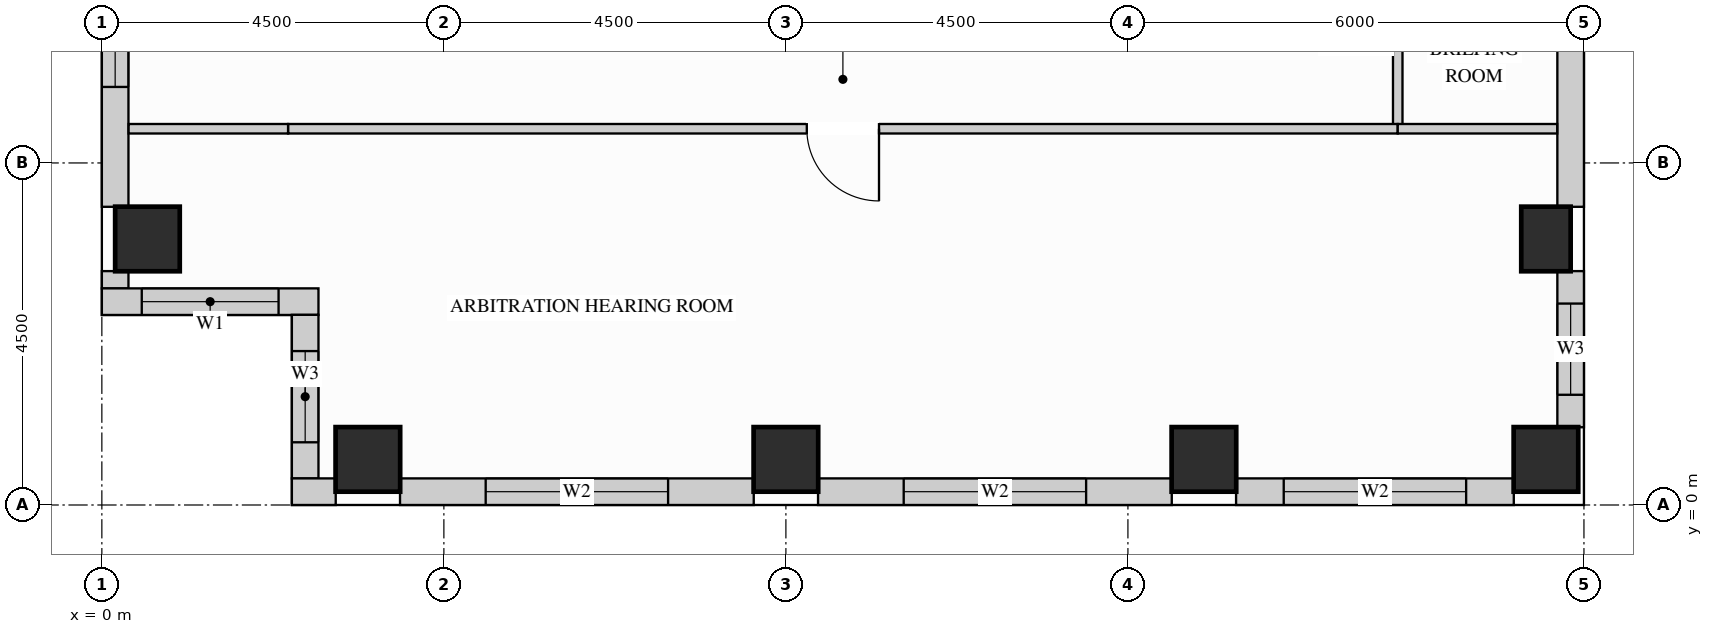
"""IFC4 building model, lengths in metres.
Left out: names, types, materials, properties, quantities, classifications, styles, units other than length and angle.
Written with IfcOpenShell. Run it as: python <this file> out.ifc"""

import sys

from ifc_helpers import new_model, si_unit, direction, frame, frame_2d, origin, origin_2d, place, context, subcontext, project, spatial, rectangle, extrude, source, transform, mapped, element, fill, save


model = new_model("IFC4")
c1 = context("Model", 3, precision=1e-05, world=origin(), true_north=direction((0.0, 1.0)))
c2 = subcontext(c1, "Body", "Model", "MODEL_VIEW")
j1 = project(units=[si_unit("LENGTHUNIT", "METRE"), si_unit("PLANEANGLEUNIT", "RADIAN")], contexts=[c1])
p1 = place(None, origin())
s1 = spatial("IfcSite", under=j1, at=p1, CompositionType="ELEMENT")
p2 = place(p1, origin())
s2 = spatial("IfcBuilding", under=s1, at=p2, CompositionType="ELEMENT")
p3 = place(p2, frame((0.0, 0.0, 223.2)))
s3 = spatial("IfcBuildingStorey", under=s2, at=p3, CompositionType="ELEMENT", Elevation=223.2)
m1 = source(origin(), c2, "Body", "SweptSolid", [
    extrude(rectangle(XDim=0.65, YDim=0.85, at=origin_2d()), origin(), (0.0, 0.0, 1.0), 3.4),
])
p4 = place(p3, frame((19.0, 3.5, 0.0), z_axis=(0.0, 0.0, 1.0), x_axis=(1.0, 0.0, 0.0)))
e1 = element("IfcColumn", 1, at=p4, inside=s3, PredefinedType="COLUMN", context=c2, shape_type="MappedRepresentation", body=[
    mapped(m1, transform((0.0, 0.0, 0.0), x_axis=(1.0, 0.0, 0.0), y_axis=(0.0, 1.0, 0.0), z_axis=(0.0, 0.0, 1.0))),
])
m2 = source(origin(), c2, "Body", "SweptSolid", [
    extrude(rectangle(XDim=0.85, YDim=0.85, at=origin_2d()), origin(), (0.0, 0.0, 1.0), 3.4),
])
for number, where, z_axis, x_axis in (
    (2, (14.5, 0.6, 0.0), (0.0, 0.0, 1.0), (1.0, 0.0, 0.0)),
    (3, (19.0, 0.6, 0.0), (0.0, 0.0, 1.0), (1.0, 0.0, 0.0)),
    (4, (3.5, 0.6, 0.0), (0.0, 0.0, 1.0), (1.0, 0.0, 0.0)),
    (5, (9.0, 0.6, 0.0), (0.0, 0.0, 1.0), (1.0, 0.0, 0.0)),
    (6, (0.6, 3.5, 0.0), (0.0, 0.0, 1.0), (1.0, 0.0, 0.0)),
):
    element("IfcColumn", number, at=place(p3, frame(where, z_axis=z_axis, x_axis=x_axis)), inside=s3, PredefinedType="COLUMN", context=c2, shape_type="MappedRepresentation", body=[
        mapped(m2, transform((0.0, 0.0, 0.0), x_axis=(1.0, 0.0, 0.0), y_axis=(0.0, 1.0, 0.0), z_axis=(0.0, 0.0, 1.0))),
    ])
p5 = place(p3, frame((0.175, 8.077, 0.0), z_axis=(0.0, 0.0, 1.0), x_axis=(0.0, -1.0, 0.0)))
e7 = element("IfcWall", 7, at=p5, inside=s3, PredefinedType="SOLIDWALL", context=c2, shape_type="SweptSolid", body=[
    extrude(rectangle(XDim=4.154, YDim=0.35, at=frame_2d((2.077, 0.0))), origin(), (0.0, 0.0, 1.0), 3.385),
])
p6 = place(p5, frame((0.777, 0.0, 0.78)))
e8 = element("IfcOpeningElement", 8, at=p6, cuts=e7, PredefinedType="OPENING", context=c2, shape_type="SweptSolid", body=[
    extrude(rectangle(XDim=1.8, YDim=2.1, at=frame_2d((0.9, 1.05))), frame((0.0, 0.185, 0.0), z_axis=(0.0, -1.0, 0.0), x_axis=(1.0, 0.0, 0.0)), (0.0, 0.0, 1.0), 0.37),
])
m3 = source(origin(), c2, "Body", "SweptSolid", [
    extrude(rectangle(XDim=0.229, YDim=0.35, at=frame_2d((0.115, 0.0))), origin(), (0.0, 0.0, 1.0), 3.385),
])
p7 = place(p3, frame((0.175, 3.077, 0.0), z_axis=(0.0, 0.0, 1.0), x_axis=(0.0, -1.0, 0.0)))
e9 = element("IfcWall", 9, at=p7, inside=s3, PredefinedType="SOLIDWALL", context=c2, shape_type="MappedRepresentation", body=[
    mapped(m3, transform((0.0, 0.0, 0.0), x_axis=(1.0, 0.0, 0.0), y_axis=(0.0, 1.0, 0.0), z_axis=(0.0, 0.0, 1.0))),
])
p8 = place(p3, frame((0.0, 2.675, 0.0), z_axis=(0.0, 0.0, 1.0), x_axis=(1.0, 0.0, 0.0)))
e10 = element("IfcWall", 10, at=p8, inside=s3, PredefinedType="SOLIDWALL", context=c2, shape_type="SweptSolid", body=[
    extrude(rectangle(XDim=2.85, YDim=0.35, at=frame_2d((1.425, 0.0))), origin(), (0.0, 0.0, 1.0), 3.385),
])
p9 = place(p8, frame((0.525, 0.0, 0.78)))
e11 = element("IfcOpeningElement", 11, at=p9, cuts=e10, PredefinedType="OPENING", context=c2, shape_type="SweptSolid", body=[
    extrude(rectangle(XDim=1.8, YDim=2.1, at=frame_2d((0.9, 1.05))), frame((0.0, 0.185, 0.0), z_axis=(0.0, -1.0, 0.0), x_axis=(1.0, 0.0, 0.0)), (0.0, 0.0, 1.0), 0.37),
])
p10 = place(p3, frame((2.675, 2.502, 0.0), z_axis=(0.0, 0.0, 1.0), x_axis=(0.0, -1.0, 0.0)))
e12 = element("IfcWall", 12, at=p10, inside=s3, PredefinedType="SOLIDWALL", context=c2, shape_type="SweptSolid", body=[
    extrude(rectangle(XDim=2.154, YDim=0.35, at=frame_2d((1.077, 0.0))), origin(), (0.0, 0.0, 1.0), 3.385),
])
p11 = place(p10, frame((0.477, 0.0, 0.78)))
e13 = element("IfcOpeningElement", 13, at=p11, cuts=e12, PredefinedType="OPENING", context=c2, shape_type="SweptSolid", body=[
    extrude(rectangle(XDim=1.2, YDim=2.1, at=frame_2d((0.6, 1.05))), frame((0.0, 0.185, 0.0), z_axis=(0.0, -1.0, 0.0), x_axis=(1.0, 0.0, 0.0)), (0.0, 0.0, 1.0), 0.37),
])
m4 = source(origin(), c2, "Body", "SweptSolid", [
    extrude(rectangle(XDim=0.577, YDim=0.35, at=frame_2d((0.289, 0.0))), origin(), (0.0, 0.0, 1.0), 3.385),
])
p12 = place(p3, frame((2.5, 0.175, 0.0), z_axis=(0.0, 0.0, 1.0), x_axis=(1.0, 0.0, 0.0)))
e14 = element("IfcWall", 14, at=p12, inside=s3, PredefinedType="SOLIDWALL", context=c2, shape_type="MappedRepresentation", body=[
    mapped(m4, transform((0.0, 0.0, 0.0), x_axis=(1.0, 0.0, 0.0), y_axis=(0.0, 1.0, 0.0), z_axis=(0.0, 0.0, 1.0))),
])
p13 = place(p3, frame((3.923, 0.175, 0.0), z_axis=(0.0, 0.0, 1.0), x_axis=(1.0, 0.0, 0.0)))
e15 = element("IfcWall", 15, at=p13, inside=s3, PredefinedType="SOLIDWALL", context=c2, shape_type="SweptSolid", body=[
    extrude(rectangle(XDim=4.654, YDim=0.35, at=frame_2d((2.327, 0.0))), origin(), (0.0, 0.0, 1.0), 3.385),
])
p14 = place(p13, frame((1.127, 0.0, 0.78)))
e16 = element("IfcOpeningElement", 16, at=p14, cuts=e15, PredefinedType="OPENING", context=c2, shape_type="SweptSolid", body=[
    extrude(rectangle(XDim=2.4, YDim=2.1, at=frame_2d((1.2, 1.05))), frame((0.0, 0.185, 0.0), z_axis=(0.0, -1.0, 0.0), x_axis=(1.0, 0.0, 0.0)), (0.0, 0.0, 1.0), 0.37),
])
p15 = place(p3, frame((9.423, 0.175, 0.0), z_axis=(0.0, 0.0, 1.0), x_axis=(1.0, 0.0, 0.0)))
e17 = element("IfcWall", 17, at=p15, inside=s3, PredefinedType="SOLIDWALL", context=c2, shape_type="SweptSolid", body=[
    extrude(rectangle(XDim=4.654, YDim=0.35, at=frame_2d((2.327, 0.0))), origin(), (0.0, 0.0, 1.0), 3.385),
])
p16 = place(p15, frame((1.127, 0.0, 0.78)))
e18 = element("IfcOpeningElement", 18, at=p16, cuts=e17, PredefinedType="OPENING", context=c2, shape_type="SweptSolid", body=[
    extrude(rectangle(XDim=2.4, YDim=2.1, at=frame_2d((1.2, 1.05))), frame((0.0, 0.185, 0.0), z_axis=(0.0, -1.0, 0.0), x_axis=(1.0, 0.0, 0.0)), (0.0, 0.0, 1.0), 0.37),
])
p17 = place(p3, frame((14.923, 0.175, 0.0), z_axis=(0.0, 0.0, 1.0), x_axis=(1.0, 0.0, 0.0)))
e19 = element("IfcWall", 19, at=p17, inside=s3, PredefinedType="SOLIDWALL", context=c2, shape_type="SweptSolid", body=[
    extrude(rectangle(XDim=3.654, YDim=0.35, at=frame_2d((1.827, 0.0))), origin(), (0.0, 0.0, 1.0), 3.385),
])
p18 = place(p17, frame((0.627, 0.0, 0.78)))
e20 = element("IfcOpeningElement", 20, at=p18, cuts=e19, PredefinedType="OPENING", context=c2, shape_type="SweptSolid", body=[
    extrude(rectangle(XDim=2.4, YDim=2.1, at=frame_2d((1.2, 1.05))), frame((0.0, 0.185, 0.0), z_axis=(0.0, -1.0, 0.0), x_axis=(1.0, 0.0, 0.0)), (0.0, 0.0, 1.0), 0.37),
])
p19 = place(p3, frame((19.325, 1.023, 0.0), z_axis=(0.0, 0.0, 1.0), x_axis=(0.0, 1.0, 0.0)))
e21 = element("IfcWall", 21, at=p19, inside=s3, PredefinedType="SOLIDWALL", context=c2, shape_type="SweptSolid", body=[
    extrude(rectangle(XDim=2.054, YDim=0.35, at=frame_2d((1.027, 0.0))), origin(), (0.0, 0.0, 1.0), 2.619),
])
p20 = place(p19, frame((0.427, 0.0, 0.78)))
e22 = element("IfcOpeningElement", 22, at=p20, cuts=e21, PredefinedType="OPENING", context=c2, shape_type="SweptSolid", body=[
    extrude(rectangle(XDim=1.2, YDim=1.659, at=frame_2d((0.6, 0.83))), frame((0.0, 0.185, 0.0), z_axis=(0.0, -1.0, 0.0), x_axis=(1.0, 0.0, 0.0)), (0.0, 0.0, 1.0), 0.37),
])
m5 = source(origin(), c2, "Body", "SweptSolid", [
    extrude(rectangle(XDim=4.154, YDim=0.35, at=frame_2d((2.077, 0.0))), origin(), (0.0, 0.0, 1.0), 2.619),
])
p21 = place(p3, frame((19.325, 3.923, 0.0), z_axis=(0.0, 0.0, 1.0), x_axis=(0.0, 1.0, 0.0)))
e23 = element("IfcWall", 23, at=p21, inside=s3, PredefinedType="SOLIDWALL", context=c2, shape_type="MappedRepresentation", body=[
    mapped(m5, transform((0.0, 0.0, 0.0), x_axis=(1.0, 0.0, 0.0), y_axis=(0.0, 1.0, 0.0), z_axis=(0.0, 0.0, 1.0))),
])
p22 = place(p3, frame((17.05, 4.95, 0.0), z_axis=(0.0, 0.0, 1.0), x_axis=(0.0, 1.0, 0.0)))
e24 = element("IfcWall", 24, at=p22, inside=s3, PredefinedType="PARTITIONING", context=c2, shape_type="SweptSolid", body=[
    extrude(rectangle(XDim=5.65, YDim=0.125, at=frame_2d((2.825, 0.0))), origin(), (0.0, 0.0, 1.0), 3.385),
])
p23 = place(p22, frame((2.35, 0.0, 0.0)))
e25 = element("IfcOpeningElement", 25, at=p23, cuts=e24, PredefinedType="OPENING", context=c2, shape_type="SweptSolid", body=[
    extrude(rectangle(XDim=0.95, YDim=2.15, at=frame_2d((0.475, 1.075))), frame((0.0, 0.073, 0.0), z_axis=(0.0, -1.0, 0.0), x_axis=(1.0, 0.0, 0.0)), (0.0, 0.0, 1.0), 0.145),
])
p24 = place(p3, frame((2.45, 4.95, 0.0), z_axis=(0.0, 0.0, 1.0), x_axis=(1.0, 0.0, 0.0)))
e26 = element("IfcWall", 26, at=p24, inside=s3, PredefinedType="PARTITIONING", context=c2, shape_type="SweptSolid", body=[
    extrude(rectangle(XDim=14.6, YDim=0.125, at=frame_2d((7.3, 0.0))), origin(), (0.0, 0.0, 1.0), 2.848),
])
p25 = place(p24, frame((6.825, 0.0, 0.0)))
e27 = element("IfcOpeningElement", 27, at=p25, cuts=e26, PredefinedType="OPENING", context=c2, shape_type="SweptSolid", body=[
    extrude(rectangle(XDim=0.95, YDim=2.15, at=frame_2d((0.475, 1.075))), frame((0.0, 0.073, 0.0), z_axis=(0.0, -1.0, 0.0), x_axis=(1.0, 0.0, 0.0)), (0.0, 0.0, 1.0), 0.145),
])
m6 = source(origin(), c2, "Body", "SweptSolid", [
    extrude(rectangle(XDim=2.098, YDim=0.125, at=frame_2d((1.049, 0.0))), origin(), (0.0, 0.0, 1.0), 2.848),
])
for number, where, z_axis, x_axis in (
    (28, (0.352, 4.95, 0.0), (0.0, 0.0, 1.0), (1.0, 0.0, 0.0)),
    (29, (17.05, 4.95, 0.0), (0.0, 0.0, 1.0), (1.0, 0.0, 0.0)),
):
    element("IfcWall", number, at=place(p3, frame(where, z_axis=z_axis, x_axis=x_axis)), inside=s3, PredefinedType="PARTITIONING", context=c2, shape_type="MappedRepresentation", body=[
        mapped(m6, transform((0.0, 0.0, 0.0), x_axis=(1.0, 0.0, 0.0), y_axis=(0.0, 1.0, 0.0), z_axis=(0.0, 0.0, 1.0))),
    ])
m7 = source(origin(), c2, "Body", "SweptSolid", [
    extrude(rectangle(XDim=0.95, YDim=2.15, at=frame_2d((0.475, 1.075))), frame((0.0, 0.025, 0.0), z_axis=(0.0, -1.0, 0.0), x_axis=(1.0, 0.0, 0.0)), (0.0, 0.0, 1.0), 0.05),
])
p26 = place(p25, origin())
e30 = element("IfcDoor", 30, at=p26, inside=s3, OperationType="SINGLE_SWING_RIGHT", PredefinedType="DOOR", context=c2, shape_type="MappedRepresentation", body=[
    mapped(m7, transform((0.0, 0.0, 0.0), x_axis=(1.0, 0.0, 0.0), y_axis=(0.0, 1.0, 0.0), z_axis=(0.0, 0.0, 1.0))),
])
fill(e27, e30)
m8 = source(origin(), c2, "Body", "SweptSolid", [
    extrude(rectangle(XDim=1.8, YDim=2.1, at=frame_2d((0.9, 1.05))), frame((0.0, 0.03, 0.0), z_axis=(0.0, -1.0, 0.0), x_axis=(1.0, 0.0, 0.0)), (0.0, 0.0, 1.0), 0.06),
])
p27 = place(p6, origin())
e31 = element("IfcWindow", 31, at=p27, inside=s3, PartitioningType="SINGLE_PANEL", PredefinedType="WINDOW", context=c2, shape_type="MappedRepresentation", body=[
    mapped(m8, transform((0.0, 0.0, 0.0), x_axis=(1.0, 0.0, 0.0), y_axis=(0.0, 1.0, 0.0), z_axis=(0.0, 0.0, 1.0))),
])
fill(e8, e31)
p28 = place(p9, origin())
e32 = element("IfcWindow", 32, at=p28, inside=s3, PartitioningType="SINGLE_PANEL", PredefinedType="WINDOW", context=c2, shape_type="MappedRepresentation", body=[
    mapped(m8, transform((0.0, 0.0, 0.0), x_axis=(1.0, 0.0, 0.0), y_axis=(0.0, 1.0, 0.0), z_axis=(0.0, 0.0, 1.0))),
])
fill(e11, e32)
m9 = source(origin(), c2, "Body", "SweptSolid", [
    extrude(rectangle(XDim=2.4, YDim=2.1, at=frame_2d((1.2, 1.05))), frame((0.0, 0.03, 0.0), z_axis=(0.0, -1.0, 0.0), x_axis=(1.0, 0.0, 0.0)), (0.0, 0.0, 1.0), 0.06),
])
p29 = place(p14, origin())
e33 = element("IfcWindow", 33, at=p29, inside=s3, PartitioningType="SINGLE_PANEL", PredefinedType="WINDOW", context=c2, shape_type="MappedRepresentation", body=[
    mapped(m9, transform((0.0, 0.0, 0.0), x_axis=(1.0, 0.0, 0.0), y_axis=(0.0, 1.0, 0.0), z_axis=(0.0, 0.0, 1.0))),
])
fill(e16, e33)
p30 = place(p16, origin())
e34 = element("IfcWindow", 34, at=p30, inside=s3, PartitioningType="SINGLE_PANEL", PredefinedType="WINDOW", context=c2, shape_type="MappedRepresentation", body=[
    mapped(m9, transform((0.0, 0.0, 0.0), x_axis=(1.0, 0.0, 0.0), y_axis=(0.0, 1.0, 0.0), z_axis=(0.0, 0.0, 1.0))),
])
fill(e18, e34)
p31 = place(p18, origin())
e35 = element("IfcWindow", 35, at=p31, inside=s3, PartitioningType="SINGLE_PANEL", PredefinedType="WINDOW", context=c2, shape_type="MappedRepresentation", body=[
    mapped(m9, transform((0.0, 0.0, 0.0), x_axis=(1.0, 0.0, 0.0), y_axis=(0.0, 1.0, 0.0), z_axis=(0.0, 0.0, 1.0))),
])
fill(e20, e35)
m10 = source(origin(), c2, "Body", "SweptSolid", [
    extrude(rectangle(XDim=1.2, YDim=2.1, at=frame_2d((0.6, 1.05))), frame((0.0, 0.03, 0.0), z_axis=(0.0, -1.0, 0.0), x_axis=(1.0, 0.0, 0.0)), (0.0, 0.0, 1.0), 0.06),
])
p32 = place(p11, origin())
e36 = element("IfcWindow", 36, at=p32, inside=s3, PartitioningType="SINGLE_PANEL", PredefinedType="WINDOW", context=c2, shape_type="MappedRepresentation", body=[
    mapped(m10, transform((0.0, 0.0, 0.0), x_axis=(1.0, 0.0, 0.0), y_axis=(0.0, 1.0, 0.0), z_axis=(0.0, 0.0, 1.0))),
])
fill(e13, e36)
m11 = source(origin(), c2, "Body", "SweptSolid", [
    extrude(rectangle(XDim=1.2, YDim=1.659, at=frame_2d((0.6, 0.83))), frame((0.0, 0.03, 0.0), z_axis=(0.0, -1.0, 0.0), x_axis=(1.0, 0.0, 0.0)), (0.0, 0.0, 1.0), 0.06),
])
p33 = place(p20, origin())
e37 = element("IfcWindow", 37, at=p33, inside=s3, PartitioningType="SINGLE_PANEL", PredefinedType="WINDOW", context=c2, shape_type="MappedRepresentation", body=[
    mapped(m11, transform((0.0, 0.0, 0.0), x_axis=(1.0, 0.0, 0.0), y_axis=(0.0, 1.0, 0.0), z_axis=(0.0, 0.0, 1.0))),
])
fill(e22, e37)
save(model, sys.argv[1])
